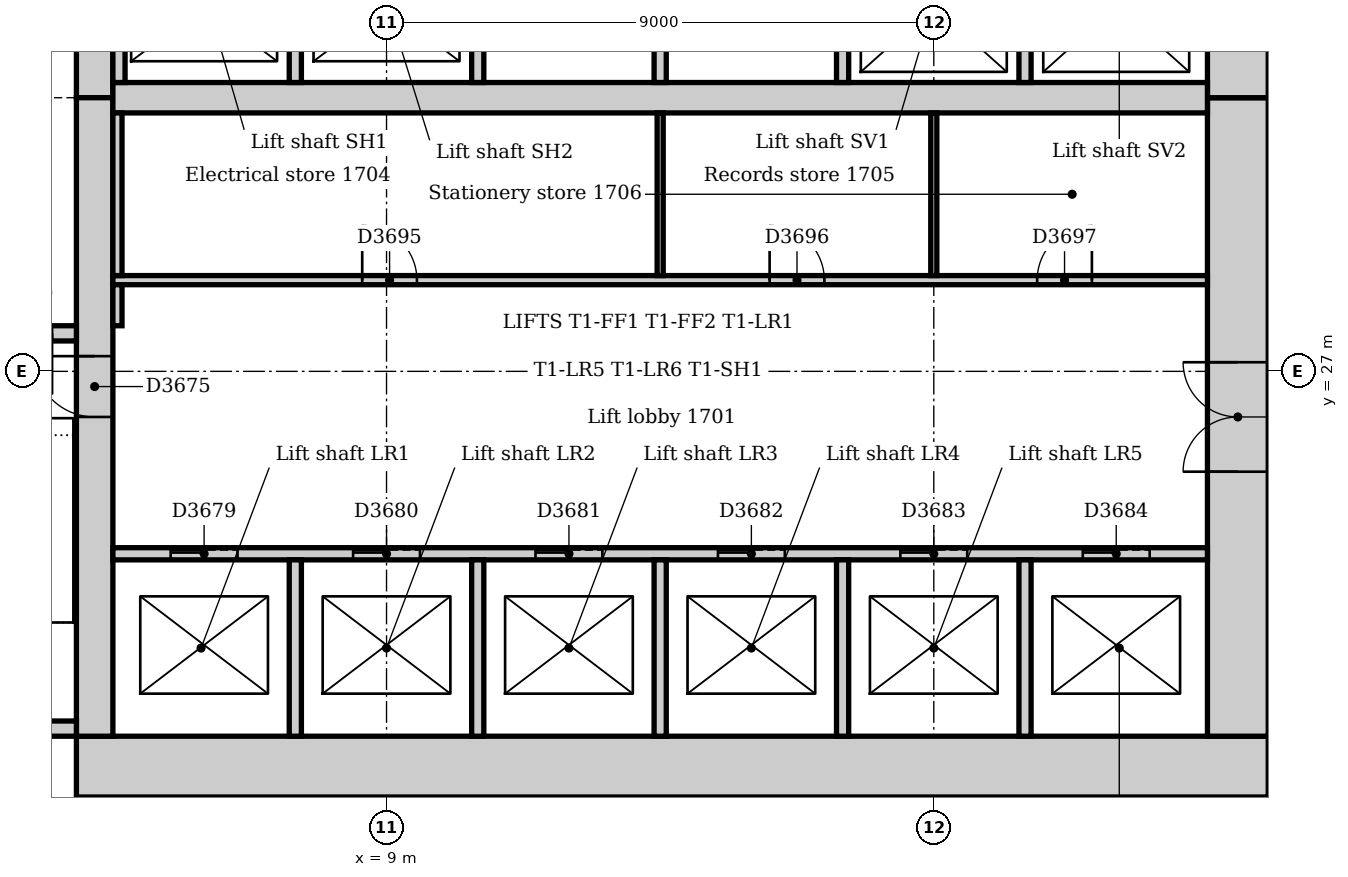
"""IFC4 building model, lengths in metres.
Left out: names, types, materials, properties, quantities, classifications, styles, units other than length and angle.
Written with IfcOpenShell. Run it as: python <this file> out.ifc"""

import sys

from ifc_helpers import new_model, si_unit, direction, frame, frame_2d, origin, place, context, subcontext, project, spatial, rectangle, extrude, element, fill, save


model = new_model("IFC4")
c1 = context("Model", 3, precision=1e-05, world=origin(), true_north=direction((0.0, 1.0)))
c2 = subcontext(c1, "Body", "Model", "MODEL_VIEW")
j1 = project(units=[si_unit("LENGTHUNIT", "METRE"), si_unit("PLANEANGLEUNIT", "RADIAN")], contexts=[c1])
p1 = place(None, origin())
s1 = spatial("IfcSite", under=j1, at=p1, CompositionType="ELEMENT")
p2 = place(p1, origin())
s2 = spatial("IfcBuilding", under=s1, at=p2, CompositionType="ELEMENT")
p3 = place(p2, frame((0.0, 0.0, 75.0)))
s3 = spatial("IfcBuildingStorey", under=s2, at=p3, CompositionType="ELEMENT", Elevation=75.0)
p4 = place(p3, frame((3.9, 20.5, 0.0), z_axis=(0.0, 0.0, 1.0), x_axis=(1.0, 0.0, 0.0)))
e1 = element("IfcWall", 1, at=p4, inside=s3, PredefinedType="SOLIDWALL", context=c2, shape_type="SweptSolid", body=[
    extrude(rectangle(XDim=19.6, YDim=1.0, at=frame_2d((9.8, 0.0))), origin(), (0.0, 0.0, 1.0), 4.0),
])
p5 = place(p3, frame((23.0, 21.0, 0.0), z_axis=(0.0, 0.0, 1.0), x_axis=(0.0, 1.0, 0.0)))
e2 = element("IfcWall", 2, at=p5, inside=s3, PredefinedType="SOLIDWALL", context=c2, shape_type="SweptSolid", body=[
    extrude(rectangle(XDim=10.5, YDim=1.0, at=frame_2d((5.25, 0.0))), origin(), (0.0, 0.0, 1.0), 4.0),
])
p6 = place(p5, frame((4.35, 0.0, 0.0)))
e3 = element("IfcOpeningElement", 3, at=p6, cuts=e2, PredefinedType="OPENING", context=c2, shape_type="SweptSolid", body=[
    extrude(rectangle(XDim=1.8, YDim=2.1, at=frame_2d((0.9, 1.05))), frame((0.0, 0.51, 0.0), z_axis=(0.0, -1.0, 0.0), x_axis=(1.0, 0.0, 0.0)), (0.0, 0.0, 1.0), 1.02),
])
p7 = place(p3, frame((23.0, 31.5, 0.0), z_axis=(0.0, 0.0, 1.0), x_axis=(0.0, 1.0, 0.0)))
e4 = element("IfcWall", 4, at=p7, inside=s3, PredefinedType="SOLIDWALL", context=c2, shape_type="SweptSolid", body=[
    extrude(rectangle(XDim=10.5, YDim=1.0, at=frame_2d((5.25, 0.0))), origin(), (0.0, 0.0, 1.0), 4.0),
])
p8 = place(p7, frame((3.15, 0.0, 0.0)))
e5 = element("IfcOpeningElement", 5, at=p8, cuts=e4, PredefinedType="OPENING", context=c2, shape_type="SweptSolid", body=[
    extrude(rectangle(XDim=1.0, YDim=2.1, at=frame_2d((0.5, 1.05))), frame((0.0, 0.51, 0.0), z_axis=(0.0, -1.0, 0.0), x_axis=(1.0, 0.0, 0.0)), (0.0, 0.0, 1.0), 1.02),
])
p9 = place(p7, frame((5.2, 0.0, 0.0)))
e6 = element("IfcOpeningElement", 6, at=p9, cuts=e4, PredefinedType="OPENING", context=c2, shape_type="SweptSolid", body=[
    extrude(rectangle(XDim=1.0, YDim=2.1, at=frame_2d((0.5, 1.05))), frame((0.0, 0.51, 0.0), z_axis=(0.0, -1.0, 0.0), x_axis=(1.0, 0.0, 0.0)), (0.0, 0.0, 1.0), 1.02),
])
p10 = place(p3, frame((4.2, 42.0, 0.0), z_axis=(0.0, 0.0, 1.0), x_axis=(0.0, -1.0, 0.0)))
e7 = element("IfcWall", 7, at=p10, inside=s3, PredefinedType="SOLIDWALL", context=c2, shape_type="SweptSolid", body=[
    extrude(rectangle(XDim=10.5, YDim=0.6, at=frame_2d((5.25, 0.0))), origin(), (0.0, 0.0, 1.0), 4.0),
])
p11 = place(p10, frame((5.3, 0.0, 0.0)))
e8 = element("IfcOpeningElement", 8, at=p11, cuts=e7, PredefinedType="OPENING", context=c2, shape_type="SweptSolid", body=[
    extrude(rectangle(XDim=1.0, YDim=2.1, at=frame_2d((0.5, 1.05))), frame((0.0, 0.31, 0.0), z_axis=(0.0, -1.0, 0.0), x_axis=(1.0, 0.0, 0.0)), (0.0, 0.0, 1.0), 0.62),
])
p12 = place(p3, frame((4.2, 31.5, 0.0), z_axis=(0.0, 0.0, 1.0), x_axis=(0.0, -1.0, 0.0)))
e9 = element("IfcWall", 9, at=p12, inside=s3, PredefinedType="SOLIDWALL", context=c2, shape_type="SweptSolid", body=[
    extrude(rectangle(XDim=10.5, YDim=0.6, at=frame_2d((5.25, 0.0))), origin(), (0.0, 0.0, 1.0), 4.0),
])
p13 = place(p12, frame((4.25, 0.0, 0.0)))
e10 = element("IfcOpeningElement", 10, at=p13, cuts=e9, PredefinedType="OPENING", context=c2, shape_type="SweptSolid", body=[
    extrude(rectangle(XDim=1.0, YDim=2.1, at=frame_2d((0.5, 1.05))), frame((0.0, 0.31, 0.0), z_axis=(0.0, -1.0, 0.0), x_axis=(1.0, 0.0, 0.0)), (0.0, 0.0, 1.0), 0.62),
])
p14 = place(p3, frame((4.5, 31.5, 0.0), z_axis=(0.0, 0.0, 1.0), x_axis=(1.0, 0.0, 0.0)))
e11 = element("IfcWall", 11, at=p14, inside=s3, PredefinedType="SOLIDWALL", context=c2, shape_type="SweptSolid", body=[
    extrude(rectangle(XDim=18.0, YDim=0.5, at=frame_2d((9.0, 0.0))), origin(), (0.0, 0.0, 1.0), 4.0),
])
p15 = place(p3, frame((0.36, 21.125, 0.0), z_axis=(0.0, 0.0, 1.0), x_axis=(1.0, 0.0, 0.0)))
e12 = element("IfcWall", 12, at=p15, inside=s3, PredefinedType="SOLIDWALL", context=c2, shape_type="SweptSolid", body=[
    extrude(rectangle(XDim=3.54, YDim=0.25, at=frame_2d((1.77, 0.0))), origin(), (0.0, 0.0, 1.0), 4.0),
])
p16 = place(p3, frame((3.9, 27.625, 0.0), z_axis=(0.0, 0.0, 1.0), x_axis=(-1.0, 0.0, 0.0)))
e13 = element("IfcWall", 13, at=p16, inside=s3, PredefinedType="SOLIDWALL", context=c2, shape_type="SweptSolid", body=[
    extrude(rectangle(XDim=3.54, YDim=0.25, at=frame_2d((1.77, 0.0))), origin(), (0.0, 0.0, 1.0), 4.0),
])
p17 = place(p16, frame((0.4, 0.0, 0.0)))
e14 = element("IfcOpeningElement", 14, at=p17, cuts=e13, PredefinedType="OPENING", context=c2, shape_type="SweptSolid", body=[
    extrude(rectangle(XDim=1.0, YDim=2.1, at=frame_2d((0.5, 1.05))), frame((0.0, 0.135, 0.0), z_axis=(0.0, -1.0, 0.0), x_axis=(1.0, 0.0, 0.0)), (0.0, 0.0, 1.0), 0.27),
])
p18 = place(p3, frame((4.5, 24.0, 0.0), z_axis=(0.0, 0.0, 1.0), x_axis=(1.0, 0.0, 0.0)))
e15 = element("IfcWall", 15, at=p18, inside=s3, PredefinedType="PARTITIONING", context=c2, shape_type="SweptSolid", body=[
    extrude(rectangle(XDim=18.0, YDim=0.2, at=frame_2d((9.0, 0.0))), origin(), (0.0, 0.0, 1.0), 3.85),
])
p19 = place(p18, frame((0.95, 0.0, 0.0)))
e16 = element("IfcOpeningElement", 16, at=p19, cuts=e15, PredefinedType="OPENING", context=c2, shape_type="SweptSolid", body=[
    extrude(rectangle(XDim=1.1, YDim=2.1, at=frame_2d((0.55, 1.05))), frame((0.0, 0.11, 0.0), z_axis=(0.0, -1.0, 0.0), x_axis=(1.0, 0.0, 0.0)), (0.0, 0.0, 1.0), 0.22),
])
p20 = place(p18, frame((3.95, 0.0, 0.0)))
e17 = element("IfcOpeningElement", 17, at=p20, cuts=e15, PredefinedType="OPENING", context=c2, shape_type="SweptSolid", body=[
    extrude(rectangle(XDim=1.1, YDim=2.1, at=frame_2d((0.55, 1.05))), frame((0.0, 0.11, 0.0), z_axis=(0.0, -1.0, 0.0), x_axis=(1.0, 0.0, 0.0)), (0.0, 0.0, 1.0), 0.22),
])
p21 = place(p18, frame((6.95, 0.0, 0.0)))
e18 = element("IfcOpeningElement", 18, at=p21, cuts=e15, PredefinedType="OPENING", context=c2, shape_type="SweptSolid", body=[
    extrude(rectangle(XDim=1.1, YDim=2.1, at=frame_2d((0.55, 1.05))), frame((0.0, 0.11, 0.0), z_axis=(0.0, -1.0, 0.0), x_axis=(1.0, 0.0, 0.0)), (0.0, 0.0, 1.0), 0.22),
])
p22 = place(p18, frame((9.95, 0.0, 0.0)))
e19 = element("IfcOpeningElement", 19, at=p22, cuts=e15, PredefinedType="OPENING", context=c2, shape_type="SweptSolid", body=[
    extrude(rectangle(XDim=1.1, YDim=2.1, at=frame_2d((0.55, 1.05))), frame((0.0, 0.11, 0.0), z_axis=(0.0, -1.0, 0.0), x_axis=(1.0, 0.0, 0.0)), (0.0, 0.0, 1.0), 0.22),
])
p23 = place(p18, frame((12.95, 0.0, 0.0)))
e20 = element("IfcOpeningElement", 20, at=p23, cuts=e15, PredefinedType="OPENING", context=c2, shape_type="SweptSolid", body=[
    extrude(rectangle(XDim=1.1, YDim=2.1, at=frame_2d((0.55, 1.05))), frame((0.0, 0.11, 0.0), z_axis=(0.0, -1.0, 0.0), x_axis=(1.0, 0.0, 0.0)), (0.0, 0.0, 1.0), 0.22),
])
p24 = place(p18, frame((15.95, 0.0, 0.0)))
e21 = element("IfcOpeningElement", 21, at=p24, cuts=e15, PredefinedType="OPENING", context=c2, shape_type="SweptSolid", body=[
    extrude(rectangle(XDim=1.1, YDim=2.1, at=frame_2d((0.55, 1.05))), frame((0.0, 0.11, 0.0), z_axis=(0.0, -1.0, 0.0), x_axis=(1.0, 0.0, 0.0)), (0.0, 0.0, 1.0), 0.22),
])
p25 = place(p3, frame((4.6, 31.75, 0.0), z_axis=(0.0, 0.0, 1.0), x_axis=(0.0, 1.0, 0.0)))
e22 = element("IfcWall", 22, at=p25, inside=s3, PredefinedType="PARTITIONING", context=c2, shape_type="SweptSolid", body=[
    extrude(rectangle(XDim=2.65, YDim=0.2, at=frame_2d((1.325, 0.0))), origin(), (0.0, 0.0, 1.0), 3.85),
])
p26 = place(p3, frame((7.5, 21.0, 0.0), z_axis=(0.0, 0.0, 1.0), x_axis=(0.0, 1.0, 0.0)))
e23 = element("IfcWall", 23, at=p26, inside=s3, PredefinedType="PARTITIONING", context=c2, shape_type="SweptSolid", body=[
    extrude(rectangle(XDim=2.9, YDim=0.2, at=frame_2d((1.45, 0.0))), origin(), (0.0, 0.0, 1.0), 3.85),
])
p27 = place(p3, frame((7.5, 31.75, 0.0), z_axis=(0.0, 0.0, 1.0), x_axis=(0.0, 1.0, 0.0)))
e24 = element("IfcWall", 24, at=p27, inside=s3, PredefinedType="PARTITIONING", context=c2, shape_type="SweptSolid", body=[
    extrude(rectangle(XDim=2.65, YDim=0.2, at=frame_2d((1.325, 0.0))), origin(), (0.0, 0.0, 1.0), 3.85),
])
p28 = place(p3, frame((10.5, 21.0, 0.0), z_axis=(0.0, 0.0, 1.0), x_axis=(0.0, 1.0, 0.0)))
e25 = element("IfcWall", 25, at=p28, inside=s3, PredefinedType="PARTITIONING", context=c2, shape_type="SweptSolid", body=[
    extrude(rectangle(XDim=2.9, YDim=0.2, at=frame_2d((1.45, 0.0))), origin(), (0.0, 0.0, 1.0), 3.85),
])
p29 = place(p3, frame((10.5, 31.75, 0.0), z_axis=(0.0, 0.0, 1.0), x_axis=(0.0, 1.0, 0.0)))
e26 = element("IfcWall", 26, at=p29, inside=s3, PredefinedType="PARTITIONING", context=c2, shape_type="SweptSolid", body=[
    extrude(rectangle(XDim=2.65, YDim=0.2, at=frame_2d((1.325, 0.0))), origin(), (0.0, 0.0, 1.0), 3.85),
])
p30 = place(p3, frame((13.5, 21.0, 0.0), z_axis=(0.0, 0.0, 1.0), x_axis=(0.0, 1.0, 0.0)))
e27 = element("IfcWall", 27, at=p30, inside=s3, PredefinedType="PARTITIONING", context=c2, shape_type="SweptSolid", body=[
    extrude(rectangle(XDim=2.9, YDim=0.2, at=frame_2d((1.45, 0.0))), origin(), (0.0, 0.0, 1.0), 3.85),
])
p31 = place(p3, frame((13.5, 31.75, 0.0), z_axis=(0.0, 0.0, 1.0), x_axis=(0.0, 1.0, 0.0)))
e28 = element("IfcWall", 28, at=p31, inside=s3, PredefinedType="PARTITIONING", context=c2, shape_type="SweptSolid", body=[
    extrude(rectangle(XDim=2.65, YDim=0.2, at=frame_2d((1.325, 0.0))), origin(), (0.0, 0.0, 1.0), 3.85),
])
p32 = place(p3, frame((16.5, 21.0, 0.0), z_axis=(0.0, 0.0, 1.0), x_axis=(0.0, 1.0, 0.0)))
e29 = element("IfcWall", 29, at=p32, inside=s3, PredefinedType="PARTITIONING", context=c2, shape_type="SweptSolid", body=[
    extrude(rectangle(XDim=2.9, YDim=0.2, at=frame_2d((1.45, 0.0))), origin(), (0.0, 0.0, 1.0), 3.85),
])
p33 = place(p3, frame((16.5, 31.75, 0.0), z_axis=(0.0, 0.0, 1.0), x_axis=(0.0, 1.0, 0.0)))
e30 = element("IfcWall", 30, at=p33, inside=s3, PredefinedType="PARTITIONING", context=c2, shape_type="SweptSolid", body=[
    extrude(rectangle(XDim=2.65, YDim=0.2, at=frame_2d((1.325, 0.0))), origin(), (0.0, 0.0, 1.0), 3.85),
])
p34 = place(p3, frame((19.5, 21.0, 0.0), z_axis=(0.0, 0.0, 1.0), x_axis=(0.0, 1.0, 0.0)))
e31 = element("IfcWall", 31, at=p34, inside=s3, PredefinedType="PARTITIONING", context=c2, shape_type="SweptSolid", body=[
    extrude(rectangle(XDim=2.9, YDim=0.2, at=frame_2d((1.45, 0.0))), origin(), (0.0, 0.0, 1.0), 3.85),
])
p35 = place(p3, frame((19.5, 31.75, 0.0), z_axis=(0.0, 0.0, 1.0), x_axis=(0.0, 1.0, 0.0)))
e32 = element("IfcWall", 32, at=p35, inside=s3, PredefinedType="PARTITIONING", context=c2, shape_type="SweptSolid", body=[
    extrude(rectangle(XDim=2.65, YDim=0.2, at=frame_2d((1.325, 0.0))), origin(), (0.0, 0.0, 1.0), 3.85),
])
p36 = place(p3, frame((4.5, 28.5, 0.0), z_axis=(0.0, 0.0, 1.0), x_axis=(1.0, 0.0, 0.0)))
e33 = element("IfcWall", 33, at=p36, inside=s3, PredefinedType="PARTITIONING", context=c2, shape_type="SweptSolid", body=[
    extrude(rectangle(XDim=18.0, YDim=0.15, at=frame_2d((9.0, 0.0))), origin(), (0.0, 0.0, 1.0), 3.85),
])
p37 = place(p36, frame((4.1, 0.0, 0.0)))
e34 = element("IfcOpeningElement", 34, at=p37, cuts=e33, PredefinedType="OPENING", context=c2, shape_type="SweptSolid", body=[
    extrude(rectangle(XDim=0.9, YDim=2.1, at=frame_2d((0.45, 1.05))), frame((0.0, 0.085, 0.0), z_axis=(0.0, -1.0, 0.0), x_axis=(1.0, 0.0, 0.0)), (0.0, 0.0, 1.0), 0.17),
])
p38 = place(p36, frame((10.8, 0.0, 0.0)))
e35 = element("IfcOpeningElement", 35, at=p38, cuts=e33, PredefinedType="OPENING", context=c2, shape_type="SweptSolid", body=[
    extrude(rectangle(XDim=0.9, YDim=2.1, at=frame_2d((0.45, 1.05))), frame((0.0, 0.085, 0.0), z_axis=(0.0, -1.0, 0.0), x_axis=(1.0, 0.0, 0.0)), (0.0, 0.0, 1.0), 0.17),
])
p39 = place(p36, frame((15.2, 0.0, 0.0)))
e36 = element("IfcOpeningElement", 36, at=p39, cuts=e33, PredefinedType="OPENING", context=c2, shape_type="SweptSolid", body=[
    extrude(rectangle(XDim=0.9, YDim=2.1, at=frame_2d((0.45, 1.05))), frame((0.0, 0.085, 0.0), z_axis=(0.0, -1.0, 0.0), x_axis=(1.0, 0.0, 0.0)), (0.0, 0.0, 1.0), 0.17),
])
p40 = place(p3, frame((4.575, 27.75, 0.0), z_axis=(0.0, 0.0, 1.0), x_axis=(0.0, 1.0, 0.0)))
e37 = element("IfcWall", 37, at=p40, inside=s3, PredefinedType="PARTITIONING", context=c2, shape_type="SweptSolid", body=[
    extrude(rectangle(XDim=0.675, YDim=0.15, at=frame_2d((0.338, 0.0))), origin(), (0.0, 0.0, 1.0), 3.85),
])
p41 = place(p3, frame((4.575, 28.575, 0.0), z_axis=(0.0, 0.0, 1.0), x_axis=(0.0, 1.0, 0.0)))
e38 = element("IfcWall", 38, at=p41, inside=s3, PredefinedType="PARTITIONING", context=c2, shape_type="SweptSolid", body=[
    extrude(rectangle(XDim=2.675, YDim=0.15, at=frame_2d((1.337, 0.0))), origin(), (0.0, 0.0, 1.0), 3.85),
])
for number, where, z_axis, x_axis in (
    (39, (13.5, 28.575, 0.0), (0.0, 0.0, 1.0), (0.0, 1.0, 0.0)),
    (40, (18.0, 28.575, 0.0), (0.0, 0.0, 1.0), (0.0, 1.0, 0.0)),
):
    element("IfcWall", number, at=place(p3, frame(where, z_axis=z_axis, x_axis=x_axis)), inside=s3, PredefinedType="PARTITIONING", context=c2, shape_type="SweptSolid", body=[
        extrude(rectangle(XDim=2.675, YDim=0.1, at=frame_2d((1.337, 0.0))), origin(), (0.0, 0.0, 1.0), 3.85),
    ])
p42 = place(p13, frame((1.0, 0.0, 0.0), z_axis=(0.0, 0.0, 1.0), x_axis=(-1.0, 0.0, 0.0)))
e41 = element("IfcDoor", 41, at=p42, inside=s3, OperationType="SINGLE_SWING_RIGHT", PredefinedType="DOOR", context=c2, shape_type="SweptSolid", body=[
    extrude(rectangle(XDim=1.0, YDim=2.1, at=frame_2d((0.5, 1.05))), frame((0.0, 0.025, 0.0), z_axis=(0.0, -1.0, 0.0), x_axis=(1.0, 0.0, 0.0)), (0.0, 0.0, 1.0), 0.05),
])
fill(e10, e41)
p43 = place(p19, origin())
e42 = element("IfcDoor", 42, at=p43, inside=s3, OperationType="SLIDING_TO_LEFT", PredefinedType="DOOR", context=c2, shape_type="SweptSolid", body=[
    extrude(rectangle(XDim=1.1, YDim=2.1, at=frame_2d((0.55, 1.05))), frame((0.0, 0.025, 0.0), z_axis=(0.0, -1.0, 0.0), x_axis=(1.0, 0.0, 0.0)), (0.0, 0.0, 1.0), 0.05),
])
fill(e16, e42)
p44 = place(p20, origin())
e43 = element("IfcDoor", 43, at=p44, inside=s3, OperationType="SLIDING_TO_LEFT", PredefinedType="DOOR", context=c2, shape_type="SweptSolid", body=[
    extrude(rectangle(XDim=1.1, YDim=2.1, at=frame_2d((0.55, 1.05))), frame((0.0, 0.025, 0.0), z_axis=(0.0, -1.0, 0.0), x_axis=(1.0, 0.0, 0.0)), (0.0, 0.0, 1.0), 0.05),
])
fill(e17, e43)
p45 = place(p21, origin())
e44 = element("IfcDoor", 44, at=p45, inside=s3, OperationType="SLIDING_TO_LEFT", PredefinedType="DOOR", context=c2, shape_type="SweptSolid", body=[
    extrude(rectangle(XDim=1.1, YDim=2.1, at=frame_2d((0.55, 1.05))), frame((0.0, 0.025, 0.0), z_axis=(0.0, -1.0, 0.0), x_axis=(1.0, 0.0, 0.0)), (0.0, 0.0, 1.0), 0.05),
])
fill(e18, e44)
p46 = place(p22, origin())
e45 = element("IfcDoor", 45, at=p46, inside=s3, OperationType="SLIDING_TO_LEFT", PredefinedType="DOOR", context=c2, shape_type="SweptSolid", body=[
    extrude(rectangle(XDim=1.1, YDim=2.1, at=frame_2d((0.55, 1.05))), frame((0.0, 0.025, 0.0), z_axis=(0.0, -1.0, 0.0), x_axis=(1.0, 0.0, 0.0)), (0.0, 0.0, 1.0), 0.05),
])
fill(e19, e45)
p47 = place(p23, origin())
e46 = element("IfcDoor", 46, at=p47, inside=s3, OperationType="SLIDING_TO_LEFT", PredefinedType="DOOR", context=c2, shape_type="SweptSolid", body=[
    extrude(rectangle(XDim=1.1, YDim=2.1, at=frame_2d((0.55, 1.05))), frame((0.0, 0.025, 0.0), z_axis=(0.0, -1.0, 0.0), x_axis=(1.0, 0.0, 0.0)), (0.0, 0.0, 1.0), 0.05),
])
fill(e20, e46)
p48 = place(p24, origin())
e47 = element("IfcDoor", 47, at=p48, inside=s3, OperationType="SLIDING_TO_LEFT", PredefinedType="DOOR", context=c2, shape_type="SweptSolid", body=[
    extrude(rectangle(XDim=1.1, YDim=2.1, at=frame_2d((0.55, 1.05))), frame((0.0, 0.025, 0.0), z_axis=(0.0, -1.0, 0.0), x_axis=(1.0, 0.0, 0.0)), (0.0, 0.0, 1.0), 0.05),
])
fill(e21, e47)
p49 = place(p6, origin())
e48 = element("IfcDoor", 48, at=p49, inside=s3, OperationType="DOUBLE_DOOR_DOUBLE_SWING", PredefinedType="DOOR", context=c2, shape_type="SweptSolid", body=[
    extrude(rectangle(XDim=1.8, YDim=2.1, at=frame_2d((0.9, 1.05))), frame((0.0, 0.025, 0.0), z_axis=(0.0, -1.0, 0.0), x_axis=(1.0, 0.0, 0.0)), (0.0, 0.0, 1.0), 0.05),
])
fill(e3, e48)
p50 = place(p37, origin())
e49 = element("IfcDoor", 49, at=p50, inside=s3, OperationType="SINGLE_SWING_LEFT", PredefinedType="DOOR", context=c2, shape_type="SweptSolid", body=[
    extrude(rectangle(XDim=0.9, YDim=2.1, at=frame_2d((0.45, 1.05))), frame((0.0, 0.025, 0.0), z_axis=(0.0, -1.0, 0.0), x_axis=(1.0, 0.0, 0.0)), (0.0, 0.0, 1.0), 0.05),
])
fill(e34, e49)
p51 = place(p38, origin())
e50 = element("IfcDoor", 50, at=p51, inside=s3, OperationType="SINGLE_SWING_LEFT", PredefinedType="DOOR", context=c2, shape_type="SweptSolid", body=[
    extrude(rectangle(XDim=0.9, YDim=2.1, at=frame_2d((0.45, 1.05))), frame((0.0, 0.025, 0.0), z_axis=(0.0, -1.0, 0.0), x_axis=(1.0, 0.0, 0.0)), (0.0, 0.0, 1.0), 0.05),
])
fill(e35, e50)
p52 = place(p39, origin())
e51 = element("IfcDoor", 51, at=p52, inside=s3, OperationType="SINGLE_SWING_RIGHT", PredefinedType="DOOR", context=c2, shape_type="SweptSolid", body=[
    extrude(rectangle(XDim=0.9, YDim=2.1, at=frame_2d((0.45, 1.05))), frame((0.0, 0.025, 0.0), z_axis=(0.0, -1.0, 0.0), x_axis=(1.0, 0.0, 0.0)), (0.0, 0.0, 1.0), 0.05),
])
fill(e36, e51)
save(model, sys.argv[1])
